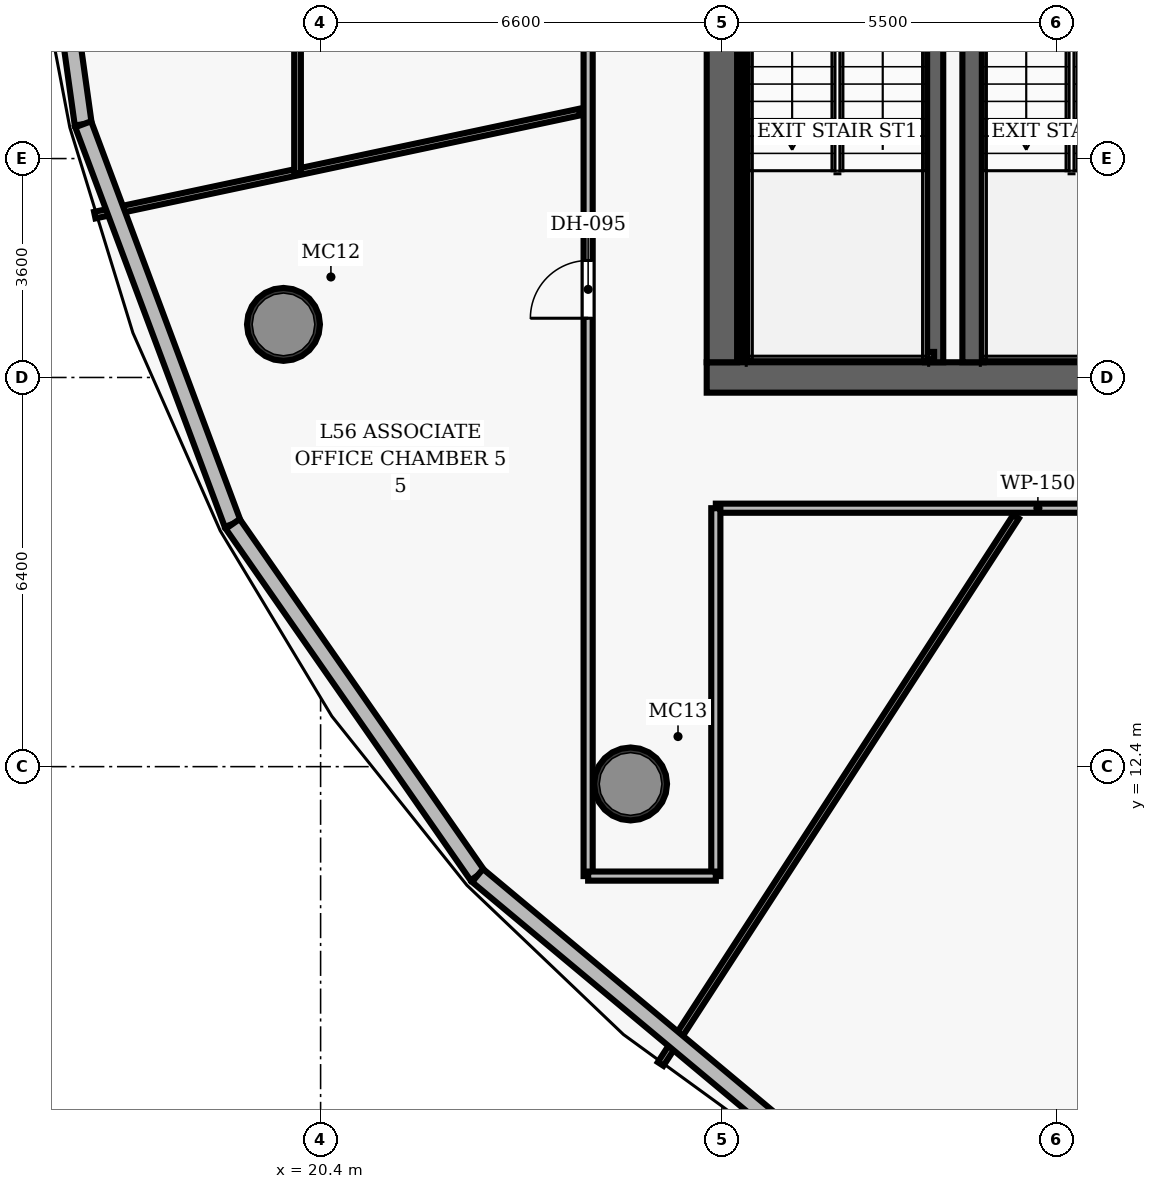
"""IFC4 building model, lengths in metres.
Left out: names, types, materials, properties, quantities, classifications, styles, units other than length and angle.
Written with IfcOpenShell. Run it as: python <this file> out.ifc"""

import sys

from ifc_helpers import new_model, si_unit, direction, frame, frame_2d, origin, origin_2d, place, context, subcontext, project, spatial, rectangle, hollow_circle, extrude, element, fill, save


model = new_model("IFC4")
c1 = context("Model", 3, precision=1e-05, world=origin(), true_north=direction((0.0, 1.0)))
c2 = subcontext(c1, "Body", "Model", "MODEL_VIEW")
j1 = project(units=[si_unit("LENGTHUNIT", "METRE"), si_unit("PLANEANGLEUNIT", "RADIAN")], contexts=[c1])
p1 = place(None, origin())
s1 = spatial("IfcSite", under=j1, at=p1, CompositionType="ELEMENT")
p2 = place(p1, origin())
s2 = spatial("IfcBuilding", under=s1, at=p2, CompositionType="ELEMENT")
p3 = place(p2, frame((0.0, 0.0, 221.25)))
s3 = spatial("IfcBuildingStorey", under=s2, at=p3, CompositionType="ELEMENT", Elevation=221.25)
p4 = place(p3, frame((26.75, 18.8, 0.0), z_axis=(0.0, 0.0, 1.0), x_axis=(1.0, 0.0, 0.0)))
e1 = element("IfcWall", 1, at=p4, inside=s3, PredefinedType="SHEAR", context=c2, shape_type="SweptSolid", body=[
    extrude(rectangle(XDim=22.5, YDim=0.5, at=frame_2d((11.25, 0.0))), origin(), (0.0, 0.0, 1.0), 3.85),
])
p5 = place(p4, frame((14.47, 0.0, 0.0)))
e2 = element("IfcOpeningElement", 2, at=p5, cuts=e1, PredefinedType="OPENING", context=c2, shape_type="SweptSolid", body=[
    extrude(rectangle(XDim=1.05, YDim=2.15, at=frame_2d((0.525, 1.075))), frame((0.0, 0.26, 0.0), z_axis=(0.0, -1.0, 0.0), x_axis=(1.0, 0.0, 0.0)), (0.0, 0.0, 1.0), 0.52),
])
p6 = place(p3, frame((27.0, 19.05, 0.0), z_axis=(0.0, 0.0, 1.0), x_axis=(0.0, 1.0, 0.0)))
e3 = element("IfcWall", 3, at=p6, inside=s3, PredefinedType="SHEAR", context=c2, shape_type="SweptSolid", body=[
    extrude(rectangle(XDim=13.9, YDim=0.5, at=frame_2d((6.95, 0.0))), origin(), (0.0, 0.0, 1.0), 3.85),
])
p7 = place(p6, frame((8.2, 0.0, 0.0)))
e4 = element("IfcOpeningElement", 4, at=p7, cuts=e3, PredefinedType="OPENING", context=c2, shape_type="SweptSolid", body=[
    extrude(rectangle(XDim=1.05, YDim=2.15, at=frame_2d((0.525, 1.075))), frame((0.0, 0.26, 0.0), z_axis=(0.0, -1.0, 0.0), x_axis=(1.0, 0.0, 0.0)), (0.0, 0.0, 1.0), 0.52),
])
p8 = place(p3, frame((31.13, 19.05, 0.0), z_axis=(0.0, 0.0, 1.0), x_axis=(0.0, 1.0, 0.0)))
e5 = element("IfcWall", 5, at=p8, inside=s3, PredefinedType="SHEAR", context=c2, shape_type="SweptSolid", body=[
    extrude(rectangle(XDim=13.9, YDim=0.35, at=frame_2d((6.95, 0.0))), origin(), (0.0, 0.0, 1.0), 3.85),
])
for number, where, z_axis, x_axis in (
    (6, (19.79, 19.673, 0.0), (0.0, 0.0, 1.0), (1.0, 0.0, 0.0)),
    (7, (25.498, 12.115, 0.0), (0.0, 0.0, 1.0), (1.0, 0.0, 0.0)),
):
    element("IfcColumn", number, at=place(p3, frame(where, z_axis=z_axis, x_axis=x_axis)), inside=s3, PredefinedType="COLUMN", context=c2, shape_type="SweptSolid", body=[
        extrude(hollow_circle(Radius=0.6, WallThickness=0.05, at=origin_2d()), origin(), (0.0, 0.0, 1.0), 3.85),
    ])
p9 = place(p3, frame((30.49, 19.05, 0.0), z_axis=(0.0, 0.0, 1.0), x_axis=(0.0, 1.0, 0.0)))
e8 = element("IfcWall", 8, at=p9, inside=s3, PredefinedType="SHEAR", context=c2, shape_type="SweptSolid", body=[
    extrude(rectangle(XDim=7.5, YDim=0.3, at=frame_2d((3.75, 0.0))), origin(), (0.0, 0.0, 1.0), 3.85),
])
p10 = place(p3, frame((27.395, 19.1, 0.0), z_axis=(0.0, 0.0, 1.0), x_axis=(0.0, 1.0, 0.0)))
e9 = element("IfcWall", 9, at=p10, inside=s3, PredefinedType="SHEAR", context=c2, shape_type="SweptSolid", body=[
    extrude(rectangle(XDim=7.45, YDim=0.12, at=frame_2d((3.725, 0.0))), origin(), (0.0, 0.0, 1.0), 3.85),
])
p11 = place(p3, frame((27.395, 19.16, 0.0), z_axis=(0.0, 0.0, 1.0), x_axis=(1.0, 0.0, 0.0)))
e10 = element("IfcWall", 10, at=p11, inside=s3, PredefinedType="SHEAR", context=c2, shape_type="SweptSolid", body=[
    extrude(rectangle(XDim=3.095, YDim=0.12, at=frame_2d((1.547, 0.0))), origin(), (0.0, 0.0, 1.0), 3.85),
])
p12 = place(p3, frame((31.3, 19.16, 0.0), z_axis=(0.0, 0.0, 1.0), x_axis=(1.0, 0.0, 0.0)))
e11 = element("IfcWall", 11, at=p12, inside=s3, PredefinedType="SHEAR", context=c2, shape_type="SweptSolid", body=[
    extrude(rectangle(XDim=3.04, YDim=0.12, at=frame_2d((1.52, 0.0))), origin(), (0.0, 0.0, 1.0), 3.85),
])
p13 = place(p3, frame((26.9, 16.65, 0.0), z_axis=(0.0, 0.0, 1.0), x_axis=(1.0, 0.0, 0.0)))
e12 = element("IfcWall", 12, at=p13, inside=s3, PredefinedType="PARTITIONING", context=c2, shape_type="SweptSolid", body=[
    extrude(rectangle(XDim=22.2, YDim=0.15, at=frame_2d((11.1, 0.0))), origin(), (0.0, 0.0, 1.0), 3.035),
])
p14 = place(p13, frame((10.744, 0.0, 0.0)))
e13 = element("IfcOpeningElement", 13, at=p14, cuts=e12, PredefinedType="OPENING", context=c2, shape_type="SweptSolid", body=[
    extrude(rectangle(XDim=0.95, YDim=2.15, at=frame_2d((0.475, 1.075))), frame((0.0, 0.085, 0.0), z_axis=(0.0, -1.0, 0.0), x_axis=(1.0, 0.0, 0.0)), (0.0, 0.0, 1.0), 0.17),
])
p15 = place(p13, frame((17.033, 0.0, 0.0)))
e14 = element("IfcOpeningElement", 14, at=p15, cuts=e12, PredefinedType="OPENING", context=c2, shape_type="SweptSolid", body=[
    extrude(rectangle(XDim=0.95, YDim=2.15, at=frame_2d((0.475, 1.075))), frame((0.0, 0.085, 0.0), z_axis=(0.0, -1.0, 0.0), x_axis=(1.0, 0.0, 0.0)), (0.0, 0.0, 1.0), 0.17),
])
p16 = place(p3, frame((24.8, 10.6, 0.0), z_axis=(0.0, 0.0, 1.0), x_axis=(0.0, 1.0, 0.0)))
e15 = element("IfcWall", 15, at=p16, inside=s3, PredefinedType="PARTITIONING", context=c2, shape_type="SweptSolid", body=[
    extrude(rectangle(XDim=30.8, YDim=0.15, at=frame_2d((15.4, 0.0))), origin(), (0.0, 0.0, 1.0), 3.035),
])
p17 = place(p16, frame((20.858, 0.0, 0.0)))
e16 = element("IfcOpeningElement", 16, at=p17, cuts=e15, PredefinedType="OPENING", context=c2, shape_type="SweptSolid", body=[
    extrude(rectangle(XDim=0.95, YDim=2.15, at=frame_2d((0.475, 1.075))), frame((0.0, 0.085, 0.0), z_axis=(0.0, -1.0, 0.0), x_axis=(1.0, 0.0, 0.0)), (0.0, 0.0, 1.0), 0.17),
])
p18 = place(p16, frame((9.174, 0.0, 0.0)))
e17 = element("IfcOpeningElement", 17, at=p18, cuts=e15, PredefinedType="OPENING", context=c2, shape_type="SweptSolid", body=[
    extrude(rectangle(XDim=0.95, YDim=2.15, at=frame_2d((0.475, 1.075))), frame((0.0, 0.085, 0.0), z_axis=(0.0, -1.0, 0.0), x_axis=(1.0, 0.0, 0.0)), (0.0, 0.0, 1.0), 0.17),
])
p19 = place(p3, frame((26.9, 10.6, 0.0), z_axis=(0.0, 0.0, 1.0), x_axis=(0.0, 1.0, 0.0)))
e18 = element("IfcWall", 18, at=p19, inside=s3, PredefinedType="PARTITIONING", context=c2, shape_type="SweptSolid", body=[
    extrude(rectangle(XDim=6.05, YDim=0.15, at=frame_2d((3.025, 0.0))), origin(), (0.0, 0.0, 1.0), 3.035),
])
p20 = place(p3, frame((24.8, 10.6, 0.0), z_axis=(0.0, 0.0, 1.0), x_axis=(1.0, 0.0, 0.0)))
e19 = element("IfcWall", 19, at=p20, inside=s3, PredefinedType="PARTITIONING", context=c2, shape_type="SweptSolid", body=[
    extrude(rectangle(XDim=2.1, YDim=0.15, at=frame_2d((1.05, 0.0))), origin(), (0.0, 0.0, 1.0), 3.035),
])
p21 = place(p3, frame((24.66, 23.165, 0.0), z_axis=(0.0, 0.0, 1.0), x_axis=(-0.978144691983, -0.207925374944, 0.0)))
e20 = element("IfcWall", 20, at=p21, inside=s3, PredefinedType="PARTITIONING", context=c2, shape_type="SweptSolid", body=[
    extrude(rectangle(XDim=8.152, YDim=0.11, at=frame_2d((4.076, 0.0))), origin(), (0.0, 0.0, 1.0), 3.035),
])
p22 = place(p3, frame((31.837, 16.51, 0.0), z_axis=(0.0, 0.0, 1.0), x_axis=(-0.544642851203, -0.838668089672, 0.0)))
e21 = element("IfcWall", 21, at=p22, inside=s3, PredefinedType="PARTITIONING", context=c2, shape_type="SweptSolid", body=[
    extrude(rectangle(XDim=10.731, YDim=0.11, at=frame_2d((5.366, 0.0))), origin(), (0.0, 0.0, 1.0), 3.035),
])
p23 = place(p3, frame((20.021, 22.158, 0.0), z_axis=(0.0, 0.0, 1.0), x_axis=(0.0, 1.0, 0.0)))
e22 = element("IfcWall", 22, at=p23, inside=s3, PredefinedType="PARTITIONING", context=c2, shape_type="SweptSolid", body=[
    extrude(rectangle(XDim=15.542, YDim=0.11, at=frame_2d((7.771, 0.0))), origin(), (0.0, 0.0, 1.0), 3.035),
])
p24 = place(p23, frame((7.171, 0.0, 0.0)))
e23 = element("IfcOpeningElement", 23, at=p24, cuts=e22, PredefinedType="OPENING", context=c2, shape_type="SweptSolid", body=[
    extrude(rectangle(XDim=1.2, YDim=2.15, at=frame_2d((0.6, 1.075))), frame((0.0, 0.065, 0.0), z_axis=(0.0, -1.0, 0.0), x_axis=(1.0, 0.0, 0.0)), (0.0, 0.0, 1.0), 0.13),
])
p25 = place(p3, frame((16.496, 22.965, 0.0), z_axis=(0.0, 0.0, 1.0), x_axis=(-0.13825677768, 0.990396417313, 0.0)))
e24 = element("IfcWall", 24, at=p25, inside=s3, PredefinedType="SOLIDWALL", context=c2, shape_type="SweptSolid", body=[
    extrude(rectangle(XDim=6.784, YDim=0.28, at=frame_2d((3.392, 0.0))), origin(), (0.0, 0.0, 1.0), 3.62),
])
p26 = place(p3, frame((18.955, 16.392, 0.0), z_axis=(0.0, 0.0, 1.0), x_axis=(-0.350357019434, 0.936616228203, 0.0)))
e25 = element("IfcWall", 25, at=p26, inside=s3, PredefinedType="SOLIDWALL", context=c2, shape_type="SweptSolid", body=[
    extrude(rectangle(XDim=7.018, YDim=0.28, at=frame_2d((3.509, 0.0))), origin(), (0.0, 0.0, 1.0), 3.62),
])
p27 = place(p3, frame((22.981, 10.61, 0.0), z_axis=(0.0, 0.0, 1.0), x_axis=(-0.571514171207, 0.820592195984, 0.0)))
e26 = element("IfcWall", 26, at=p27, inside=s3, PredefinedType="SOLIDWALL", context=c2, shape_type="SweptSolid", body=[
    extrude(rectangle(XDim=7.045, YDim=0.28, at=frame_2d((3.523, 0.0))), origin(), (0.0, 0.0, 1.0), 3.62),
])
p28 = place(p3, frame((28.39, 6.095, 0.0), z_axis=(0.0, 0.0, 1.0), x_axis=(-0.767669978916, 0.640845381876, 0.0)))
e27 = element("IfcWall", 27, at=p28, inside=s3, PredefinedType="SOLIDWALL", context=c2, shape_type="SweptSolid", body=[
    extrude(rectangle(XDim=7.046, YDim=0.28, at=frame_2d((3.523, 0.0))), origin(), (0.0, 0.0, 1.0), 3.62),
])
p29 = place(p18, origin())
e28 = element("IfcDoor", 28, at=p29, inside=s3, OperationType="SINGLE_SWING_LEFT", PredefinedType="DOOR", context=c2, shape_type="SweptSolid", body=[
    extrude(rectangle(XDim=0.95, YDim=2.15, at=frame_2d((0.475, 1.075))), frame((0.0, 0.025, 0.0), z_axis=(0.0, -1.0, 0.0), x_axis=(1.0, 0.0, 0.0)), (0.0, 0.0, 1.0), 0.05),
])
fill(e17, e28)
save(model, sys.argv[1])
